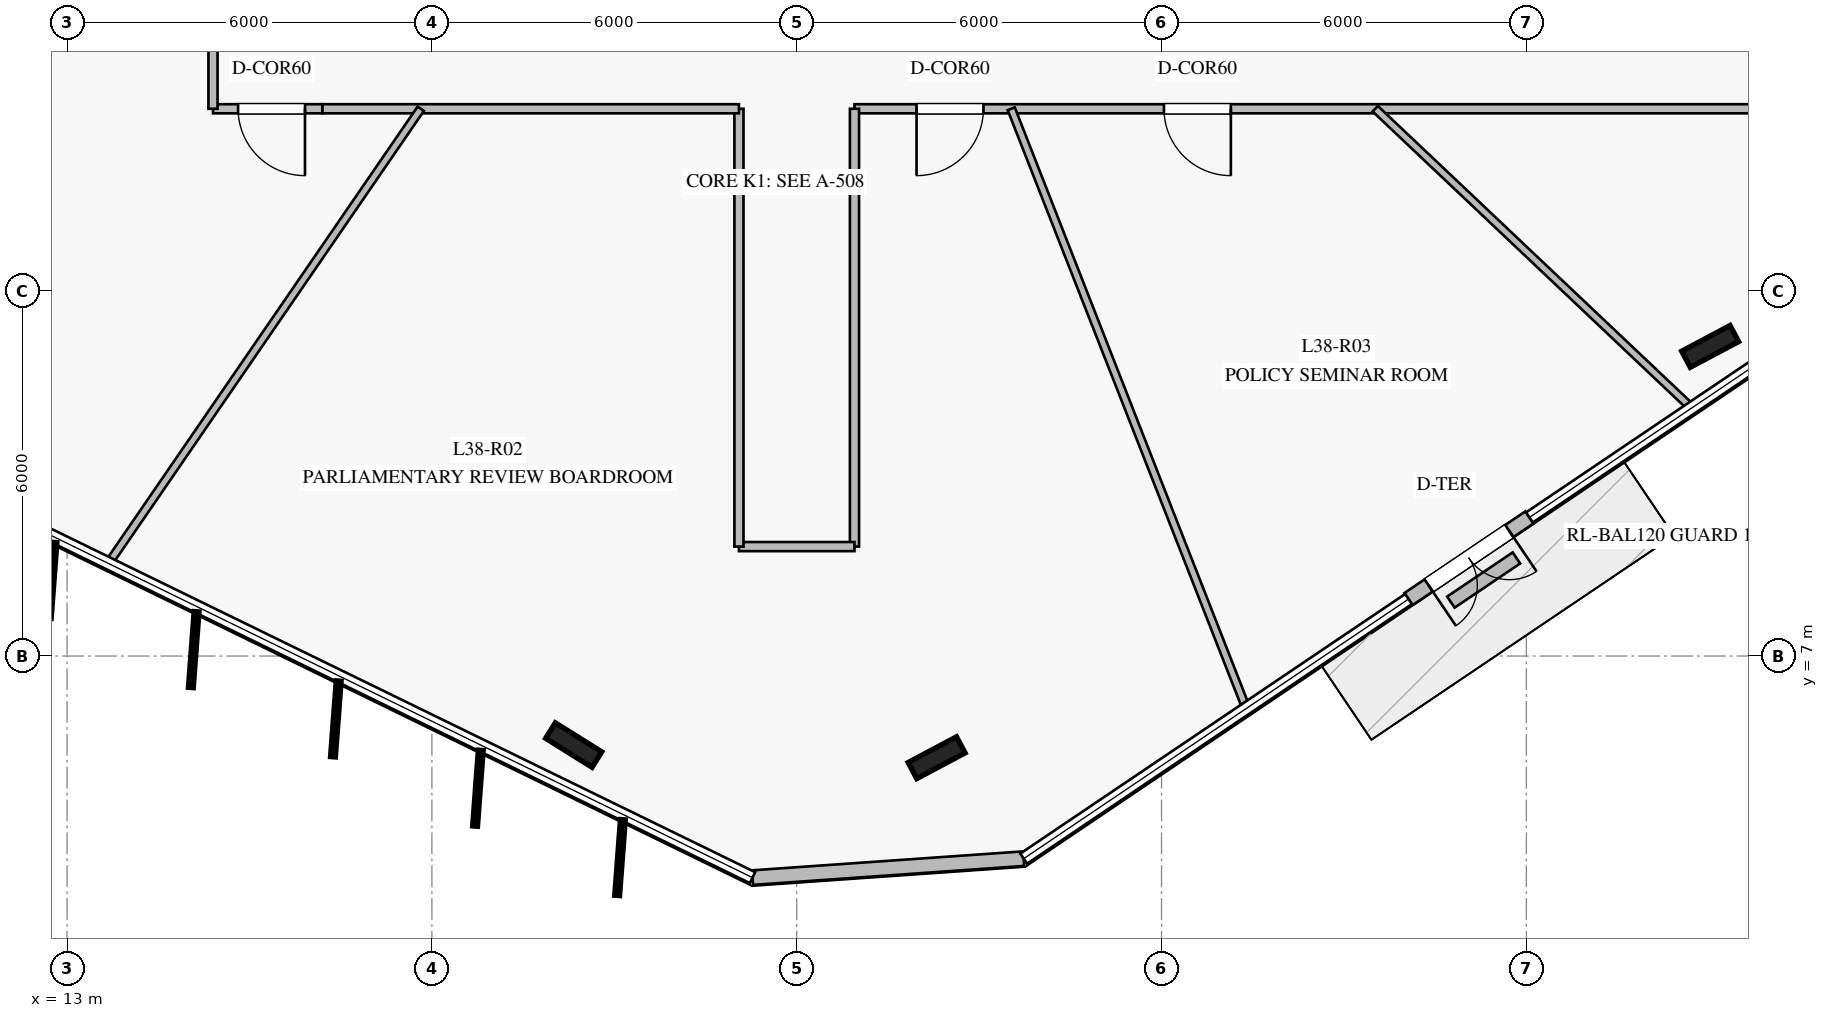
"""IFC4 building model, lengths in metres.
Left out: names, types, materials, properties, quantities, classifications, styles, units other than length and angle.
Written with IfcOpenShell. Run it as: python <this file> out.ifc"""

import sys

from ifc_helpers import new_model, si_unit, direction, frame, frame_2d, origin, origin_2d, place, context, subcontext, project, spatial, rectangle, i_section, extrude, element, fill, save


model = new_model("IFC4")
c1 = context("Model", 3, precision=1e-05, world=origin(), true_north=direction((0.0, 1.0)))
c2 = subcontext(c1, "Body", "Model", "MODEL_VIEW")
j1 = project(units=[si_unit("LENGTHUNIT", "METRE"), si_unit("PLANEANGLEUNIT", "RADIAN")], contexts=[c1])
p1 = place(None, origin())
s1 = spatial("IfcSite", under=j1, at=p1, CompositionType="ELEMENT")
p2 = place(p1, origin())
s2 = spatial("IfcBuilding", under=s1, at=p2, CompositionType="ELEMENT")
p3 = place(p2, frame((0.0, 0.0, 158.4)))
s3 = spatial("IfcBuildingStorey", under=s2, at=p3, CompositionType="ELEMENT", Elevation=158.4)
for number, where, z_axis, x_axis in (
    (1, (21.332, 5.536, 0.0), (0.0, 0.0, 1.0), (-0.848, 0.53, 0.0)),
    (2, (27.301, 5.328, 0.0), (0.0, 0.0, 1.0), (0.883, 0.469, 0.0)),
    (3, (40.023, 12.092, 0.0), (0.0, 0.0, 1.0), (0.883, 0.469, 0.0)),
):
    element("IfcColumn", number, at=place(p3, frame(where, z_axis=z_axis, x_axis=x_axis)), inside=s3, PredefinedType="COLUMN", context=c2, shape_type="SweptSolid", body=[
        extrude(i_section(OverallWidth=0.3, OverallDepth=0.9, WebThickness=0.019, FlangeThickness=0.035, at=origin_2d()), origin(), (0.0, 0.0, 1.0), 4.0),
    ])
p4 = place(p3, frame((24.273, 3.356, 0.0), z_axis=(0.0, 0.0, 1.0), x_axis=(0.997561857217, 0.069787828636, 0.0)))
e4 = element("IfcWall", 4, at=p4, inside=s3, PredefinedType="STANDARD", context=c2, shape_type="SweptSolid", body=[
    extrude(rectangle(XDim=4.471, YDim=0.24, at=frame_2d((2.235, 0.0))), origin(), (0.0, 0.0, 1.0), 3.76),
])
p5 = place(p3, frame((35.062, 7.937, 0.0), z_axis=(0.0, 0.0, 1.0), x_axis=(0.828953641959, 0.559317315558, 0.0)))
e5 = element("IfcWall", 5, at=p5, inside=s3, PredefinedType="STANDARD", context=c2, shape_type="SweptSolid", body=[
    extrude(rectangle(XDim=2.399, YDim=0.24, at=frame_2d((1.2, 0.0))), origin(), (0.0, 0.0, 1.0), 3.76),
])
p6 = place(p5, frame((0.4, 0.0, 0.0)))
e6 = element("IfcOpeningElement", 6, at=p6, cuts=e5, PredefinedType="OPENING", context=c2, shape_type="SweptSolid", body=[
    extrude(rectangle(XDim=1.6, YDim=2.25, at=frame_2d((0.8, 1.125))), frame((0.0, 0.13, 0.0), z_axis=(0.0, -1.0, 0.0), x_axis=(1.0, 0.0, 0.0)), (0.0, 0.0, 1.0), 0.26),
])
p7 = place(p3, frame((35.759, 7.887, 0.0), z_axis=(0.0, 0.0, 1.0), x_axis=(0.82938185828, 0.558682139643, 0.0)))
e7 = element("IfcWall", 7, at=p7, inside=s3, PredefinedType="USERDEFINED", context=c2, shape_type="SweptSolid", body=[
    extrude(rectangle(XDim=1.3, YDim=0.22, at=frame_2d((0.65, 0.0))), origin(), (0.0, 0.0, 1.0), 0.4),
])
p8 = place(p3, frame((17.2, 16.0, 0.0), z_axis=(0.0, 0.0, 1.0), x_axis=(-1.0, 0.0, 0.0)))
e8 = element("IfcWall", 8, at=p8, inside=s3, PredefinedType="PARTITIONING", context=c2, shape_type="SweptSolid", body=[
    extrude(rectangle(XDim=1.8, YDim=0.15, at=frame_2d((0.9, 0.0))), origin(), (0.0, 0.0, 1.0), 3.36),
])
p9 = place(p8, frame((0.287, 0.0, 0.0)))
e9 = element("IfcOpeningElement", 9, at=p9, cuts=e8, PredefinedType="OPENING", context=c2, shape_type="SweptSolid", body=[
    extrude(rectangle(XDim=1.1, YDim=2.2, at=frame_2d((0.55, 1.1))), frame((0.0, 0.085, 0.0), z_axis=(0.0, -1.0, 0.0), x_axis=(1.0, 0.0, 0.0)), (0.0, 0.0, 1.0), 0.17),
])
p10 = place(p3, frame((15.4, 16.0, 0.0), z_axis=(0.0, 0.0, 1.0), x_axis=(0.0, 1.0, 0.0)))
e10 = element("IfcWall", 10, at=p10, inside=s3, PredefinedType="PARTITIONING", context=c2, shape_type="SweptSolid", body=[
    extrude(rectangle(XDim=1.8, YDim=0.15, at=frame_2d((0.9, 0.0))), origin(), (0.0, 0.0, 1.0), 3.21),
])
p11 = place(p3, frame((41.2, 16.0, 0.0), z_axis=(0.0, 0.0, 1.0), x_axis=(-1.0, 0.0, 0.0)))
e11 = element("IfcWall", 11, at=p11, inside=s3, PredefinedType="PARTITIONING", context=c2, shape_type="SweptSolid", body=[
    extrude(rectangle(XDim=15.25, YDim=0.15, at=frame_2d((7.625, 0.0))), origin(), (0.0, 0.0, 1.0), 3.21),
])
p12 = place(p11, frame((13.129, 0.0, 0.0)))
e12 = element("IfcOpeningElement", 12, at=p12, cuts=e11, PredefinedType="OPENING", context=c2, shape_type="SweptSolid", body=[
    extrude(rectangle(XDim=1.1, YDim=2.2, at=frame_2d((0.55, 1.1))), frame((0.0, 0.085, 0.0), z_axis=(0.0, -1.0, 0.0), x_axis=(1.0, 0.0, 0.0)), (0.0, 0.0, 1.0), 0.17),
])
p13 = place(p11, frame((9.06, 0.0, 0.0)))
e13 = element("IfcOpeningElement", 13, at=p13, cuts=e11, PredefinedType="OPENING", context=c2, shape_type="SweptSolid", body=[
    extrude(rectangle(XDim=1.1, YDim=2.2, at=frame_2d((0.55, 1.1))), frame((0.0, 0.085, 0.0), z_axis=(0.0, -1.0, 0.0), x_axis=(1.0, 0.0, 0.0)), (0.0, 0.0, 1.0), 0.17),
])
p14 = place(p3, frame((25.95, 16.0, 0.0), z_axis=(0.0, 0.0, 1.0), x_axis=(0.0, -1.0, 0.0)))
e14 = element("IfcWall", 14, at=p14, inside=s3, PredefinedType="PARTITIONING", context=c2, shape_type="SweptSolid", body=[
    extrude(rectangle(XDim=7.2, YDim=0.15, at=frame_2d((3.6, 0.0))), origin(), (0.0, 0.0, 1.0), 3.36),
])
p15 = place(p3, frame((25.95, 8.8, 0.0), z_axis=(0.0, 0.0, 1.0), x_axis=(-1.0, 0.0, 0.0)))
e15 = element("IfcWall", 15, at=p15, inside=s3, PredefinedType="PARTITIONING", context=c2, shape_type="SweptSolid", body=[
    extrude(rectangle(XDim=1.9, YDim=0.15, at=frame_2d((0.95, 0.0))), origin(), (0.0, 0.0, 1.0), 3.76),
])
p16 = place(p3, frame((24.05, 8.8, 0.0), z_axis=(0.0, 0.0, 1.0), x_axis=(0.0, 1.0, 0.0)))
e16 = element("IfcWall", 16, at=p16, inside=s3, PredefinedType="PARTITIONING", context=c2, shape_type="SweptSolid", body=[
    extrude(rectangle(XDim=7.2, YDim=0.15, at=frame_2d((3.6, 0.0))), origin(), (0.0, 0.0, 1.0), 3.36),
])
p17 = place(p3, frame((24.05, 16.0, 0.0), z_axis=(0.0, 0.0, 1.0), x_axis=(-1.0, 0.0, 0.0)))
e17 = element("IfcWall", 17, at=p17, inside=s3, PredefinedType="PARTITIONING", context=c2, shape_type="SweptSolid", body=[
    extrude(rectangle(XDim=6.85, YDim=0.15, at=frame_2d((3.425, 0.0))), origin(), (0.0, 0.0, 1.0), 3.21),
])
p18 = place(p3, frame((15.4, 19.879, 0.0), z_axis=(0.0, 0.0, 1.0), x_axis=(-0.882346658186, -0.470600015712, 0.0)))
e18 = element("IfcWall", 18, at=p18, inside=s3, PredefinedType="PARTITIONING", context=c2, shape_type="SweptSolid", body=[
    extrude(rectangle(XDim=10.757, YDim=0.125, at=frame_2d((5.378, 0.0))), origin(), (0.0, 0.0, 1.0), 3.16),
])
p19 = place(p3, frame((18.817, 16.0, 0.0), z_axis=(0.0, 0.0, 1.0), x_axis=(-0.566244987329, -0.824236989175, 0.0)))
e19 = element("IfcWall", 19, at=p19, inside=s3, PredefinedType="PARTITIONING", context=c2, shape_type="SweptSolid", body=[
    extrude(rectangle(XDim=9.054, YDim=0.125, at=frame_2d((4.527, 0.0))), origin(), (0.0, 0.0, 1.0), 3.16),
])
p20 = place(p3, frame((28.528, 16.0, 0.0), z_axis=(0.0, 0.0, 1.0), x_axis=(0.364981599364, -0.931014732496, 0.0)))
e20 = element("IfcWall", 20, at=p20, inside=s3, PredefinedType="PARTITIONING", context=c2, shape_type="SweptSolid", body=[
    extrude(rectangle(XDim=10.575, YDim=0.125, at=frame_2d((5.288, 0.0))), origin(), (0.0, 0.0, 1.0), 3.16),
])
p21 = place(p3, frame((34.515, 16.0, 0.0), z_axis=(0.0, 0.0, 1.0), x_axis=(0.726513595086, -0.687152090992, 0.0)))
e21 = element("IfcWall", 21, at=p21, inside=s3, PredefinedType="PARTITIONING", context=c2, shape_type="SweptSolid", body=[
    extrude(rectangle(XDim=7.145, YDim=0.125, at=frame_2d((3.573, 0.0))), origin(), (0.0, 0.0, 1.0), 3.16),
])
p22 = place(p6, frame((1.6, 0.0, 0.0), z_axis=(0.0, 0.0, 1.0), x_axis=(-1.0, 0.0, 0.0)))
e22 = element("IfcDoor", 22, at=p22, inside=s3, OperationType="DOUBLE_DOOR_SINGLE_SWING", PredefinedType="DOOR", context=c2, shape_type="SweptSolid", body=[
    extrude(rectangle(XDim=1.6, YDim=2.25, at=frame_2d((0.8, 1.125))), frame((0.0, 0.025, 0.0), z_axis=(0.0, -1.0, 0.0), x_axis=(1.0, 0.0, 0.0)), (0.0, 0.0, 1.0), 0.05),
])
fill(e6, e22)
p23 = place(p9, origin())
e23 = element("IfcDoor", 23, at=p23, inside=s3, OperationType="SINGLE_SWING_LEFT", PredefinedType="DOOR", context=c2, shape_type="SweptSolid", body=[
    extrude(rectangle(XDim=1.1, YDim=2.2, at=frame_2d((0.55, 1.1))), frame((0.0, 0.025, 0.0), z_axis=(0.0, -1.0, 0.0), x_axis=(1.0, 0.0, 0.0)), (0.0, 0.0, 1.0), 0.05),
])
fill(e9, e23)
p24 = place(p12, origin())
e24 = element("IfcDoor", 24, at=p24, inside=s3, OperationType="SINGLE_SWING_RIGHT", PredefinedType="DOOR", context=c2, shape_type="SweptSolid", body=[
    extrude(rectangle(XDim=1.1, YDim=2.2, at=frame_2d((0.55, 1.1))), frame((0.0, 0.025, 0.0), z_axis=(0.0, -1.0, 0.0), x_axis=(1.0, 0.0, 0.0)), (0.0, 0.0, 1.0), 0.05),
])
fill(e12, e24)
p25 = place(p13, origin())
e25 = element("IfcDoor", 25, at=p25, inside=s3, OperationType="SINGLE_SWING_LEFT", PredefinedType="DOOR", context=c2, shape_type="SweptSolid", body=[
    extrude(rectangle(XDim=1.1, YDim=2.2, at=frame_2d((0.55, 1.1))), frame((0.0, 0.025, 0.0), z_axis=(0.0, -1.0, 0.0), x_axis=(1.0, 0.0, 0.0)), (0.0, 0.0, 1.0), 0.05),
])
fill(e13, e25)
save(model, sys.argv[1])
